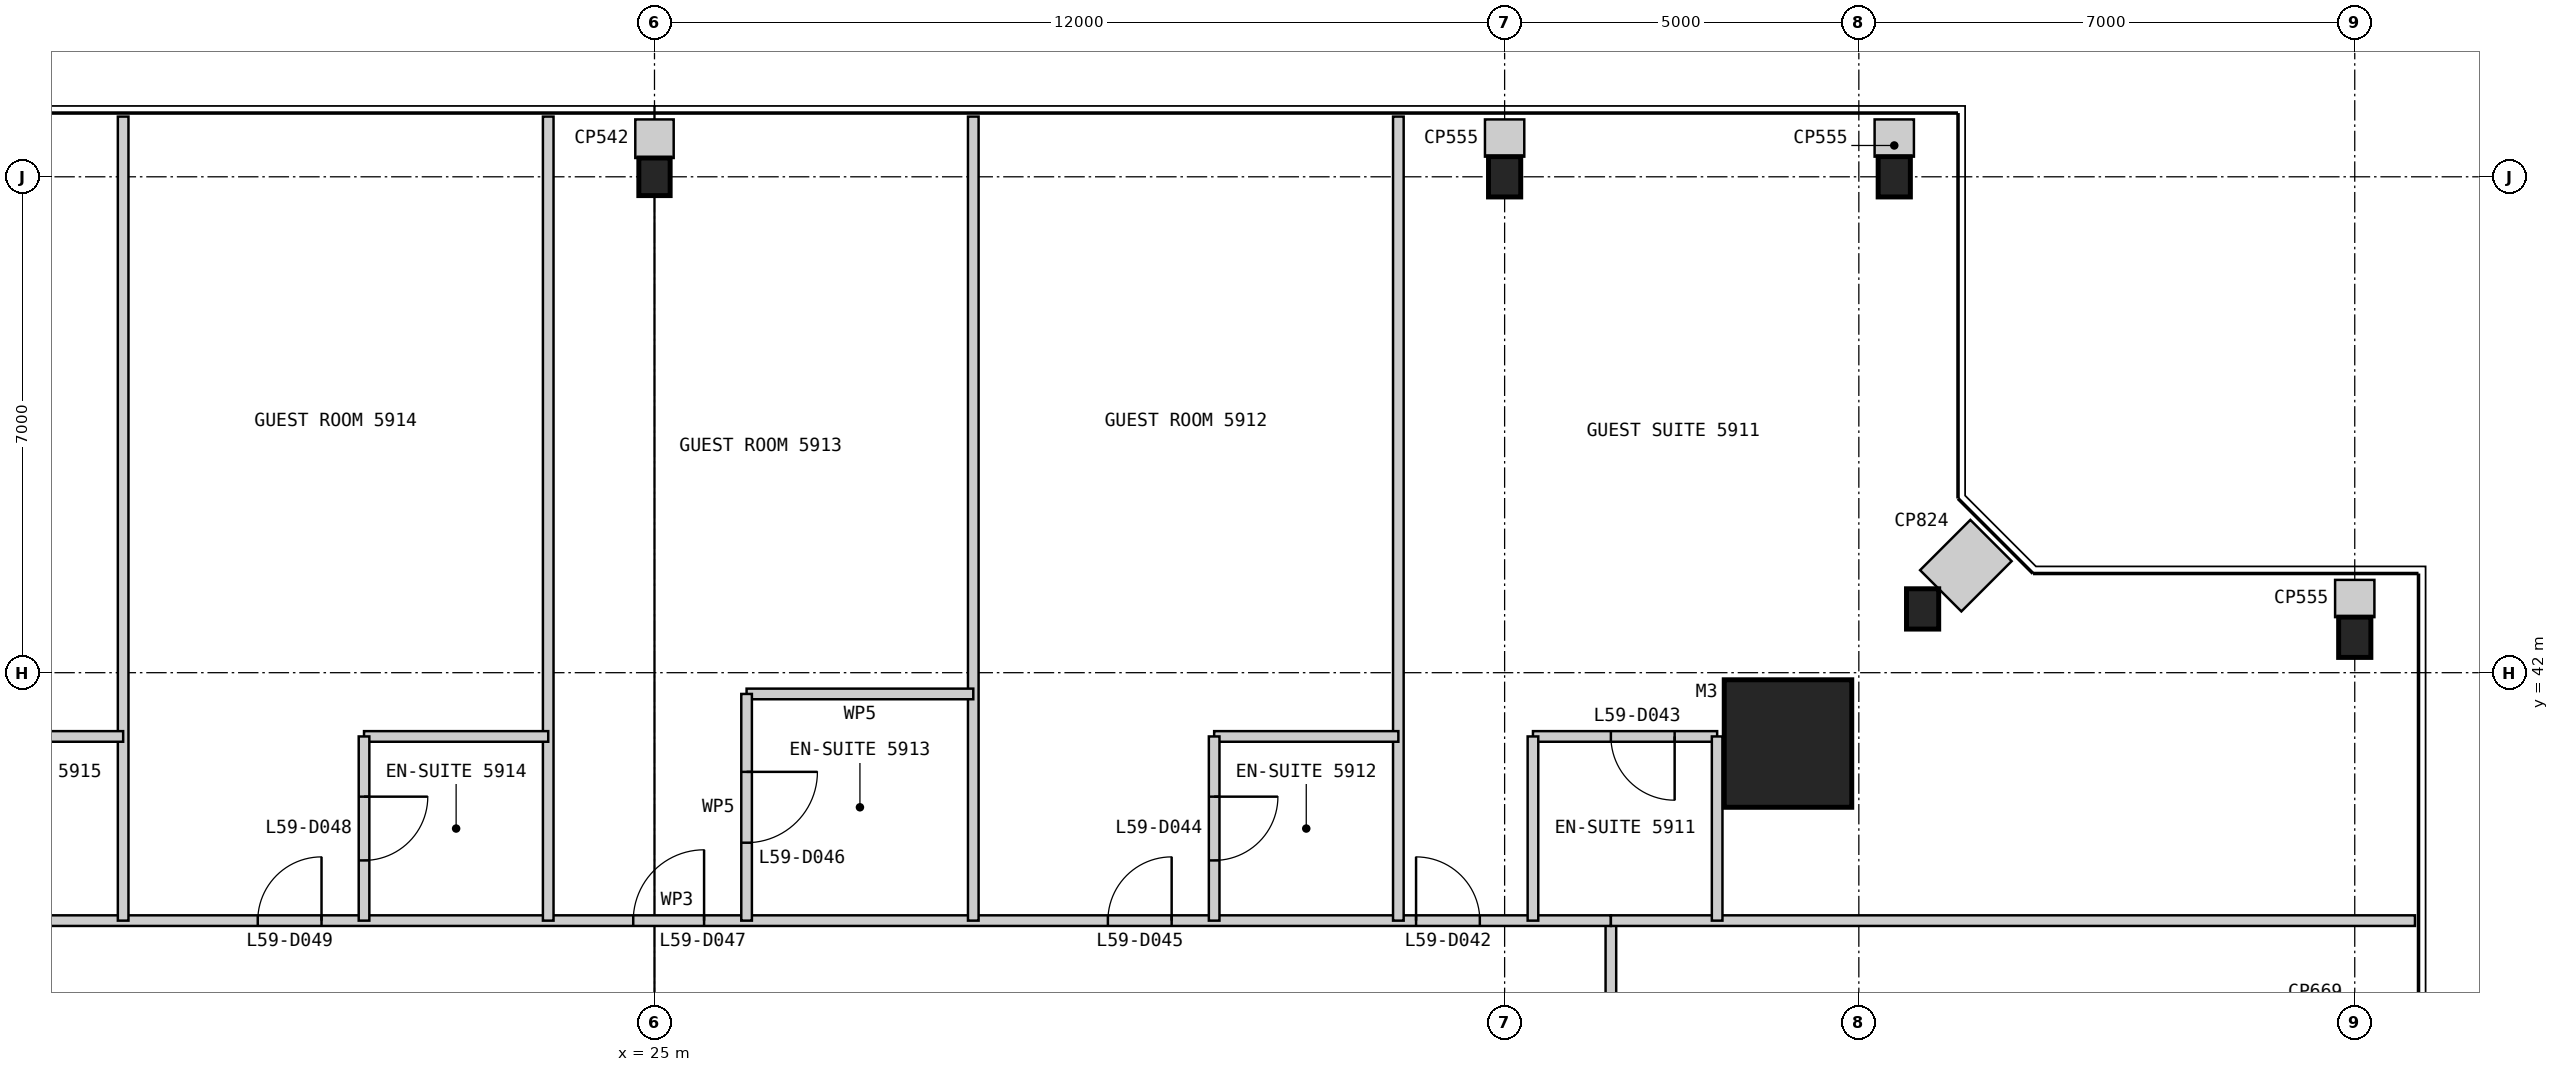
"""IFC4 building model, lengths in metres.
Left out: names, types, materials, properties, quantities, classifications, styles, units other than length and angle.
Written with IfcOpenShell. Run it as: python <this file> out.ifc"""

import sys

from ifc_helpers import new_model, si_unit, direction, frame, frame_2d, origin, origin_2d, place, context, subcontext, project, spatial, rectangle, i_section, extrude, element, fill, save


model = new_model("IFC4")
c1 = context("Model", 3, precision=1e-05, world=origin(), true_north=direction((0.0, 1.0)))
c2 = subcontext(c1, "Body", "Model", "MODEL_VIEW")
j1 = project(units=[si_unit("LENGTHUNIT", "METRE"), si_unit("PLANEANGLEUNIT", "RADIAN")], contexts=[c1])
p1 = place(None, origin())
s1 = spatial("IfcSite", under=j1, at=p1, CompositionType="ELEMENT")
p2 = place(p1, origin())
s2 = spatial("IfcBuilding", under=s1, at=p2, CompositionType="ELEMENT")
p3 = place(p2, frame((0.0, 0.0, 252.6)))
s3 = spatial("IfcBuildingStorey", under=s2, at=p3, CompositionType="ELEMENT", Elevation=252.6)
p4 = place(p3, frame((41.0, 41.0, 0.0), z_axis=(0.0, 0.0, 1.0), x_axis=(1.0, 0.0, 0.0)))
e1 = element("IfcColumn", 1, at=p4, inside=s3, PredefinedType="COLUMN", context=c2, shape_type="SweptSolid", body=[
    extrude(rectangle(XDim=1.8, YDim=1.8, at=origin_2d()), origin(), (0.0, 0.0, 1.0), 3.4),
])
for number, where, z_axis, x_axis in (
    (2, (49.0, 42.5, 0.0), (0.0, 0.0, 1.0), (1.0, 0.0, 0.0)),
    (3, (42.9, 42.9, 0.0), (0.0, 0.0, 1.0), (1.0, 0.0, 0.0)),
    (4, (42.5, 49.0, 0.0), (0.0, 0.0, 1.0), (1.0, 0.0, 0.0)),
    (5, (37.0, 49.0, 0.0), (0.0, 0.0, 1.0), (1.0, 0.0, 0.0)),
):
    element("IfcColumn", number, at=place(p3, frame(where, z_axis=z_axis, x_axis=x_axis)), inside=s3, PredefinedType="COLUMN", context=c2, shape_type="SweptSolid", body=[
        extrude(i_section(OverallWidth=0.455, OverallDepth=0.569, WebThickness=0.078, FlangeThickness=0.125, at=origin_2d()), origin(), (0.0, 0.0, 1.0), 3.4),
    ])
p5 = place(p3, frame((25.0, 49.0, 0.0), z_axis=(0.0, 0.0, 1.0), x_axis=(1.0, 0.0, 0.0)))
e6 = element("IfcColumn", 6, at=p5, inside=s3, PredefinedType="COLUMN", context=c2, shape_type="SweptSolid", body=[
    extrude(i_section(OverallWidth=0.442, OverallDepth=0.531, WebThickness=0.066, FlangeThickness=0.106, at=origin_2d()), origin(), (0.0, 0.0, 1.0), 3.4),
])
p6 = place(p3, frame((38.5, 11.5, 0.0), z_axis=(0.0, 0.0, 1.0), x_axis=(0.0, 1.0, 0.0)))
e7 = element("IfcWall", 7, at=p6, inside=s3, PredefinedType="PARTITIONING", context=c2, shape_type="SweptSolid", body=[
    extrude(rectangle(XDim=27.0, YDim=0.15, at=frame_2d((13.5, 0.0))), origin(), (0.0, 0.0, 1.0), 3.25),
])
p7 = place(p6, frame((1.85, 0.0, 0.0)))
e8 = element("IfcOpeningElement", 8, at=p7, cuts=e7, PredefinedType="OPENING", context=c2, shape_type="SweptSolid", body=[
    extrude(rectangle(XDim=0.9, YDim=2.1, at=frame_2d((0.45, 1.05))), frame((0.0, 0.085, 0.0), z_axis=(0.0, -1.0, 0.0), x_axis=(1.0, 0.0, 0.0)), (0.0, 0.0, 1.0), 0.17),
])
p8 = place(p6, frame((6.2, 0.0, 0.0)))
e9 = element("IfcOpeningElement", 9, at=p8, cuts=e7, PredefinedType="OPENING", context=c2, shape_type="SweptSolid", body=[
    extrude(rectangle(XDim=0.9, YDim=2.1, at=frame_2d((0.45, 1.05))), frame((0.0, 0.085, 0.0), z_axis=(0.0, -1.0, 0.0), x_axis=(1.0, 0.0, 0.0)), (0.0, 0.0, 1.0), 0.17),
])
p9 = place(p6, frame((12.2, 0.0, 0.0)))
e10 = element("IfcOpeningElement", 10, at=p9, cuts=e7, PredefinedType="OPENING", context=c2, shape_type="SweptSolid", body=[
    extrude(rectangle(XDim=0.9, YDim=2.1, at=frame_2d((0.45, 1.05))), frame((0.0, 0.085, 0.0), z_axis=(0.0, -1.0, 0.0), x_axis=(1.0, 0.0, 0.0)), (0.0, 0.0, 1.0), 0.17),
])
p10 = place(p6, frame((18.2, 0.0, 0.0)))
e11 = element("IfcOpeningElement", 11, at=p10, cuts=e7, PredefinedType="OPENING", context=c2, shape_type="SweptSolid", body=[
    extrude(rectangle(XDim=0.9, YDim=2.1, at=frame_2d((0.45, 1.05))), frame((0.0, 0.085, 0.0), z_axis=(0.0, -1.0, 0.0), x_axis=(1.0, 0.0, 0.0)), (0.0, 0.0, 1.0), 0.17),
])
p11 = place(p6, frame((24.2, 0.0, 0.0)))
e12 = element("IfcOpeningElement", 12, at=p11, cuts=e7, PredefinedType="OPENING", context=c2, shape_type="SweptSolid", body=[
    extrude(rectangle(XDim=0.9, YDim=2.1, at=frame_2d((0.45, 1.05))), frame((0.0, 0.085, 0.0), z_axis=(0.0, -1.0, 0.0), x_axis=(1.0, 0.0, 0.0)), (0.0, 0.0, 1.0), 0.17),
])
p12 = place(p3, frame((38.5, 38.5, 0.0), z_axis=(0.0, 0.0, 1.0), x_axis=(-1.0, 0.0, 0.0)))
e13 = element("IfcWall", 13, at=p12, inside=s3, PredefinedType="PARTITIONING", context=c2, shape_type="SweptSolid", body=[
    extrude(rectangle(XDim=27.0, YDim=0.15, at=frame_2d((13.5, 0.0))), origin(), (0.0, 0.0, 1.0), 3.25),
])
p13 = place(p12, frame((1.85, 0.0, 0.0)))
e14 = element("IfcOpeningElement", 14, at=p13, cuts=e13, PredefinedType="OPENING", context=c2, shape_type="SweptSolid", body=[
    extrude(rectangle(XDim=0.9, YDim=2.1, at=frame_2d((0.45, 1.05))), frame((0.0, 0.085, 0.0), z_axis=(0.0, -1.0, 0.0), x_axis=(1.0, 0.0, 0.0)), (0.0, 0.0, 1.0), 0.17),
])
p14 = place(p12, frame((6.2, 0.0, 0.0)))
e15 = element("IfcOpeningElement", 15, at=p14, cuts=e13, PredefinedType="OPENING", context=c2, shape_type="SweptSolid", body=[
    extrude(rectangle(XDim=0.9, YDim=2.1, at=frame_2d((0.45, 1.05))), frame((0.0, 0.085, 0.0), z_axis=(0.0, -1.0, 0.0), x_axis=(1.0, 0.0, 0.0)), (0.0, 0.0, 1.0), 0.17),
])
p15 = place(p12, frame((12.8, 0.0, 0.0)))
e16 = element("IfcOpeningElement", 16, at=p15, cuts=e13, PredefinedType="OPENING", context=c2, shape_type="SweptSolid", body=[
    extrude(rectangle(XDim=1.0, YDim=2.1, at=frame_2d((0.5, 1.05))), frame((0.0, 0.085, 0.0), z_axis=(0.0, -1.0, 0.0), x_axis=(1.0, 0.0, 0.0)), (0.0, 0.0, 1.0), 0.17),
])
p16 = place(p12, frame((18.2, 0.0, 0.0)))
e17 = element("IfcOpeningElement", 17, at=p16, cuts=e13, PredefinedType="OPENING", context=c2, shape_type="SweptSolid", body=[
    extrude(rectangle(XDim=0.9, YDim=2.1, at=frame_2d((0.45, 1.05))), frame((0.0, 0.085, 0.0), z_axis=(0.0, -1.0, 0.0), x_axis=(1.0, 0.0, 0.0)), (0.0, 0.0, 1.0), 0.17),
])
p17 = place(p12, frame((24.2, 0.0, 0.0)))
e18 = element("IfcOpeningElement", 18, at=p17, cuts=e13, PredefinedType="OPENING", context=c2, shape_type="SweptSolid", body=[
    extrude(rectangle(XDim=0.9, YDim=2.1, at=frame_2d((0.45, 1.05))), frame((0.0, 0.085, 0.0), z_axis=(0.0, -1.0, 0.0), x_axis=(1.0, 0.0, 0.0)), (0.0, 0.0, 1.0), 0.17),
])
p18 = place(p3, frame((49.85, 38.5, 0.0), z_axis=(0.0, 0.0, 1.0), x_axis=(-1.0, 0.0, 0.0)))
e19 = element("IfcWall", 19, at=p18, inside=s3, PredefinedType="PARTITIONING", context=c2, shape_type="SweptSolid", body=[
    extrude(rectangle(XDim=11.35, YDim=0.15, at=frame_2d((5.675, 0.0))), origin(), (0.0, 0.0, 1.0), 3.25),
])
p19 = place(p3, frame((40.0, 41.1, 0.0), z_axis=(0.0, 0.0, 1.0), x_axis=(-1.0, 0.0, 0.0)))
e20 = element("IfcWall", 20, at=p19, inside=s3, PredefinedType="PARTITIONING", context=c2, shape_type="SweptSolid", body=[
    extrude(rectangle(XDim=2.6, YDim=0.15, at=frame_2d((1.3, 0.0))), origin(), (0.0, 0.0, 1.0), 2.638),
])
p20 = place(p19, frame((0.6, 0.0, 0.0)))
e21 = element("IfcOpeningElement", 21, at=p20, cuts=e20, PredefinedType="OPENING", context=c2, shape_type="SweptSolid", body=[
    extrude(rectangle(XDim=0.9, YDim=2.1, at=frame_2d((0.45, 1.05))), frame((0.0, 0.085, 0.0), z_axis=(0.0, -1.0, 0.0), x_axis=(1.0, 0.0, 0.0)), (0.0, 0.0, 1.0), 0.17),
])
for number, where, z_axis, x_axis in (
    (22, (40.0, 41.1, 0.0), (0.0, 0.0, 1.0), (0.0, -1.0, 0.0)),
    (23, (37.4, 41.1, 0.0), (0.0, 0.0, 1.0), (0.0, -1.0, 0.0)),
):
    element("IfcWall", number, at=place(p3, frame(where, z_axis=z_axis, x_axis=x_axis)), inside=s3, PredefinedType="PARTITIONING", context=c2, shape_type="SweptSolid", body=[
        extrude(rectangle(XDim=2.6, YDim=0.15, at=frame_2d((1.3, 0.0))), origin(), (0.0, 0.0, 1.0), 3.25),
    ])
p21 = place(p3, frame((35.5, 49.85, 0.0), z_axis=(0.0, 0.0, 1.0), x_axis=(0.0, -1.0, 0.0)))
e24 = element("IfcWall", 24, at=p21, inside=s3, PredefinedType="PARTITIONING", context=c2, shape_type="SweptSolid", body=[
    extrude(rectangle(XDim=11.35, YDim=0.15, at=frame_2d((5.675, 0.0))), origin(), (0.0, 0.0, 1.0), 3.25),
])
p22 = place(p3, frame((35.5, 41.1, 0.0), z_axis=(0.0, 0.0, 1.0), x_axis=(-1.0, 0.0, 0.0)))
e25 = element("IfcWall", 25, at=p22, inside=s3, PredefinedType="PARTITIONING", context=c2, shape_type="SweptSolid", body=[
    extrude(rectangle(XDim=2.6, YDim=0.15, at=frame_2d((1.3, 0.0))), origin(), (0.0, 0.0, 1.0), 3.25),
])
p23 = place(p3, frame((32.9, 41.1, 0.0), z_axis=(0.0, 0.0, 1.0), x_axis=(0.0, -1.0, 0.0)))
e26 = element("IfcWall", 26, at=p23, inside=s3, PredefinedType="PARTITIONING", context=c2, shape_type="SweptSolid", body=[
    extrude(rectangle(XDim=2.6, YDim=0.15, at=frame_2d((1.3, 0.0))), origin(), (0.0, 0.0, 1.0), 3.25),
])
p24 = place(p23, frame((0.85, 0.0, 0.0)))
e27 = element("IfcOpeningElement", 27, at=p24, cuts=e26, PredefinedType="OPENING", context=c2, shape_type="SweptSolid", body=[
    extrude(rectangle(XDim=0.9, YDim=2.1, at=frame_2d((0.45, 1.05))), frame((0.0, 0.085, 0.0), z_axis=(0.0, -1.0, 0.0), x_axis=(1.0, 0.0, 0.0)), (0.0, 0.0, 1.0), 0.17),
])
p25 = place(p3, frame((29.5, 49.85, 0.0), z_axis=(0.0, 0.0, 1.0), x_axis=(0.0, -1.0, 0.0)))
e28 = element("IfcWall", 28, at=p25, inside=s3, PredefinedType="PARTITIONING", context=c2, shape_type="SweptSolid", body=[
    extrude(rectangle(XDim=11.35, YDim=0.15, at=frame_2d((5.675, 0.0))), origin(), (0.0, 0.0, 1.0), 3.25),
])
p26 = place(p3, frame((29.5, 41.7, 0.0), z_axis=(0.0, 0.0, 1.0), x_axis=(-1.0, 0.0, 0.0)))
e29 = element("IfcWall", 29, at=p26, inside=s3, PredefinedType="PARTITIONING", context=c2, shape_type="SweptSolid", body=[
    extrude(rectangle(XDim=3.2, YDim=0.15, at=frame_2d((1.6, 0.0))), origin(), (0.0, 0.0, 1.0), 3.25),
])
p27 = place(p3, frame((26.3, 41.7, 0.0), z_axis=(0.0, 0.0, 1.0), x_axis=(0.0, -1.0, 0.0)))
e30 = element("IfcWall", 30, at=p27, inside=s3, PredefinedType="PARTITIONING", context=c2, shape_type="SweptSolid", body=[
    extrude(rectangle(XDim=3.2, YDim=0.15, at=frame_2d((1.6, 0.0))), origin(), (0.0, 0.0, 1.0), 3.25),
])
p28 = place(p27, frame((1.1, 0.0, 0.0)))
e31 = element("IfcOpeningElement", 31, at=p28, cuts=e30, PredefinedType="OPENING", context=c2, shape_type="SweptSolid", body=[
    extrude(rectangle(XDim=1.0, YDim=2.1, at=frame_2d((0.5, 1.05))), frame((0.0, 0.085, 0.0), z_axis=(0.0, -1.0, 0.0), x_axis=(1.0, 0.0, 0.0)), (0.0, 0.0, 1.0), 0.17),
])
p29 = place(p3, frame((23.5, 49.85, 0.0), z_axis=(0.0, 0.0, 1.0), x_axis=(0.0, -1.0, 0.0)))
e32 = element("IfcWall", 32, at=p29, inside=s3, PredefinedType="PARTITIONING", context=c2, shape_type="SweptSolid", body=[
    extrude(rectangle(XDim=11.35, YDim=0.15, at=frame_2d((5.675, 0.0))), origin(), (0.0, 0.0, 1.0), 3.25),
])
p30 = place(p3, frame((23.5, 41.1, 0.0), z_axis=(0.0, 0.0, 1.0), x_axis=(-1.0, 0.0, 0.0)))
e33 = element("IfcWall", 33, at=p30, inside=s3, PredefinedType="PARTITIONING", context=c2, shape_type="SweptSolid", body=[
    extrude(rectangle(XDim=2.6, YDim=0.15, at=frame_2d((1.3, 0.0))), origin(), (0.0, 0.0, 1.0), 3.25),
])
p31 = place(p3, frame((20.9, 41.1, 0.0), z_axis=(0.0, 0.0, 1.0), x_axis=(0.0, -1.0, 0.0)))
e34 = element("IfcWall", 34, at=p31, inside=s3, PredefinedType="PARTITIONING", context=c2, shape_type="SweptSolid", body=[
    extrude(rectangle(XDim=2.6, YDim=0.15, at=frame_2d((1.3, 0.0))), origin(), (0.0, 0.0, 1.0), 3.25),
])
p32 = place(p31, frame((0.85, 0.0, 0.0)))
e35 = element("IfcOpeningElement", 35, at=p32, cuts=e34, PredefinedType="OPENING", context=c2, shape_type="SweptSolid", body=[
    extrude(rectangle(XDim=0.9, YDim=2.1, at=frame_2d((0.45, 1.05))), frame((0.0, 0.085, 0.0), z_axis=(0.0, -1.0, 0.0), x_axis=(1.0, 0.0, 0.0)), (0.0, 0.0, 1.0), 0.17),
])
p33 = place(p3, frame((17.5, 49.85, 0.0), z_axis=(0.0, 0.0, 1.0), x_axis=(0.0, -1.0, 0.0)))
e36 = element("IfcWall", 36, at=p33, inside=s3, PredefinedType="PARTITIONING", context=c2, shape_type="SweptSolid", body=[
    extrude(rectangle(XDim=11.35, YDim=0.15, at=frame_2d((5.675, 0.0))), origin(), (0.0, 0.0, 1.0), 3.25),
])
p34 = place(p3, frame((17.5, 41.1, 0.0), z_axis=(0.0, 0.0, 1.0), x_axis=(-1.0, 0.0, 0.0)))
e37 = element("IfcWall", 37, at=p34, inside=s3, PredefinedType="PARTITIONING", context=c2, shape_type="SweptSolid", body=[
    extrude(rectangle(XDim=2.6, YDim=0.15, at=frame_2d((1.3, 0.0))), origin(), (0.0, 0.0, 1.0), 3.25),
])
p35 = place(p3, frame((49.0, 43.31, 0.0), z_axis=(0.0, 0.0, 1.0), x_axis=(0.0, -1.0, 0.0)))
e38 = element("IfcWall", 38, at=p35, inside=s3, PredefinedType="PARTITIONING", context=c2, shape_type="SweptSolid", body=[
    extrude(rectangle(XDim=0.526, YDim=0.555, at=frame_2d((0.263, 0.0))), origin(), (0.0, 0.0, 1.0), 3.25),
])
p36 = place(p3, frame((43.866, 43.866, 0.0), z_axis=(0.0, 0.0, 1.0), x_axis=(-0.707106781187, -0.707106781187, 0.0)))
e39 = element("IfcWall", 39, at=p36, inside=s3, PredefinedType="PARTITIONING", context=c2, shape_type="SweptSolid", body=[
    extrude(rectangle(XDim=1.004, YDim=0.824, at=frame_2d((0.502, 0.0))), origin(), (0.0, 0.0, 1.0), 3.25),
])
for number, where, z_axis, x_axis in (
    (40, (42.5, 49.81, 0.0), (0.0, 0.0, 1.0), (0.0, -1.0, 0.0)),
    (41, (37.0, 49.81, 0.0), (0.0, 0.0, 1.0), (0.0, -1.0, 0.0)),
):
    element("IfcWall", number, at=place(p3, frame(where, z_axis=z_axis, x_axis=x_axis)), inside=s3, PredefinedType="PARTITIONING", context=c2, shape_type="SweptSolid", body=[
        extrude(rectangle(XDim=0.526, YDim=0.555, at=frame_2d((0.263, 0.0))), origin(), (0.0, 0.0, 1.0), 3.25),
    ])
p37 = place(p3, frame((25.0, 49.81, 0.0), z_axis=(0.0, 0.0, 1.0), x_axis=(0.0, -1.0, 0.0)))
e42 = element("IfcWall", 42, at=p37, inside=s3, PredefinedType="PARTITIONING", context=c2, shape_type="SweptSolid", body=[
    extrude(rectangle(XDim=0.545, YDim=0.542, at=frame_2d((0.272, 0.0))), origin(), (0.0, 0.0, 1.0), 3.25),
])
p38 = place(p13, frame((0.9, 0.0, 0.0), z_axis=(0.0, 0.0, 1.0), x_axis=(-1.0, 0.0, 0.0)))
e43 = element("IfcDoor", 43, at=p38, inside=s3, OperationType="SINGLE_SWING_LEFT", PredefinedType="DOOR", context=c2, shape_type="SweptSolid", body=[
    extrude(rectangle(XDim=0.9, YDim=2.1, at=frame_2d((0.45, 1.05))), frame((0.0, 0.025, 0.0), z_axis=(0.0, -1.0, 0.0), x_axis=(1.0, 0.0, 0.0)), (0.0, 0.0, 1.0), 0.05),
])
fill(e14, e43)
p39 = place(p20, origin())
e44 = element("IfcDoor", 44, at=p39, inside=s3, OperationType="SINGLE_SWING_LEFT", PredefinedType="DOOR", context=c2, shape_type="SweptSolid", body=[
    extrude(rectangle(XDim=0.9, YDim=2.1, at=frame_2d((0.45, 1.05))), frame((0.0, 0.025, 0.0), z_axis=(0.0, -1.0, 0.0), x_axis=(1.0, 0.0, 0.0)), (0.0, 0.0, 1.0), 0.05),
])
fill(e21, e44)
p40 = place(p24, origin())
e45 = element("IfcDoor", 45, at=p40, inside=s3, OperationType="SINGLE_SWING_LEFT", PredefinedType="DOOR", context=c2, shape_type="SweptSolid", body=[
    extrude(rectangle(XDim=0.9, YDim=2.1, at=frame_2d((0.45, 1.05))), frame((0.0, 0.025, 0.0), z_axis=(0.0, -1.0, 0.0), x_axis=(1.0, 0.0, 0.0)), (0.0, 0.0, 1.0), 0.05),
])
fill(e27, e45)
p41 = place(p14, frame((0.9, 0.0, 0.0), z_axis=(0.0, 0.0, 1.0), x_axis=(-1.0, 0.0, 0.0)))
e46 = element("IfcDoor", 46, at=p41, inside=s3, OperationType="SINGLE_SWING_RIGHT", PredefinedType="DOOR", context=c2, shape_type="SweptSolid", body=[
    extrude(rectangle(XDim=0.9, YDim=2.1, at=frame_2d((0.45, 1.05))), frame((0.0, 0.025, 0.0), z_axis=(0.0, -1.0, 0.0), x_axis=(1.0, 0.0, 0.0)), (0.0, 0.0, 1.0), 0.05),
])
fill(e15, e46)
p42 = place(p28, origin())
e47 = element("IfcDoor", 47, at=p42, inside=s3, OperationType="SINGLE_SWING_LEFT", PredefinedType="DOOR", context=c2, shape_type="SweptSolid", body=[
    extrude(rectangle(XDim=1.0, YDim=2.1, at=frame_2d((0.5, 1.05))), frame((0.0, 0.025, 0.0), z_axis=(0.0, -1.0, 0.0), x_axis=(1.0, 0.0, 0.0)), (0.0, 0.0, 1.0), 0.05),
])
fill(e31, e47)
p43 = place(p15, frame((1.0, 0.0, 0.0), z_axis=(0.0, 0.0, 1.0), x_axis=(-1.0, 0.0, 0.0)))
e48 = element("IfcDoor", 48, at=p43, inside=s3, OperationType="SINGLE_SWING_RIGHT", PredefinedType="DOOR", context=c2, shape_type="SweptSolid", body=[
    extrude(rectangle(XDim=1.0, YDim=2.1, at=frame_2d((0.5, 1.05))), frame((0.0, 0.025, 0.0), z_axis=(0.0, -1.0, 0.0), x_axis=(1.0, 0.0, 0.0)), (0.0, 0.0, 1.0), 0.05),
])
fill(e16, e48)
p44 = place(p32, origin())
e49 = element("IfcDoor", 49, at=p44, inside=s3, OperationType="SINGLE_SWING_LEFT", PredefinedType="DOOR", context=c2, shape_type="SweptSolid", body=[
    extrude(rectangle(XDim=0.9, YDim=2.1, at=frame_2d((0.45, 1.05))), frame((0.0, 0.025, 0.0), z_axis=(0.0, -1.0, 0.0), x_axis=(1.0, 0.0, 0.0)), (0.0, 0.0, 1.0), 0.05),
])
fill(e35, e49)
p45 = place(p16, frame((0.9, 0.0, 0.0), z_axis=(0.0, 0.0, 1.0), x_axis=(-1.0, 0.0, 0.0)))
e50 = element("IfcDoor", 50, at=p45, inside=s3, OperationType="SINGLE_SWING_RIGHT", PredefinedType="DOOR", context=c2, shape_type="SweptSolid", body=[
    extrude(rectangle(XDim=0.9, YDim=2.1, at=frame_2d((0.45, 1.05))), frame((0.0, 0.025, 0.0), z_axis=(0.0, -1.0, 0.0), x_axis=(1.0, 0.0, 0.0)), (0.0, 0.0, 1.0), 0.05),
])
fill(e17, e50)
save(model, sys.argv[1])
